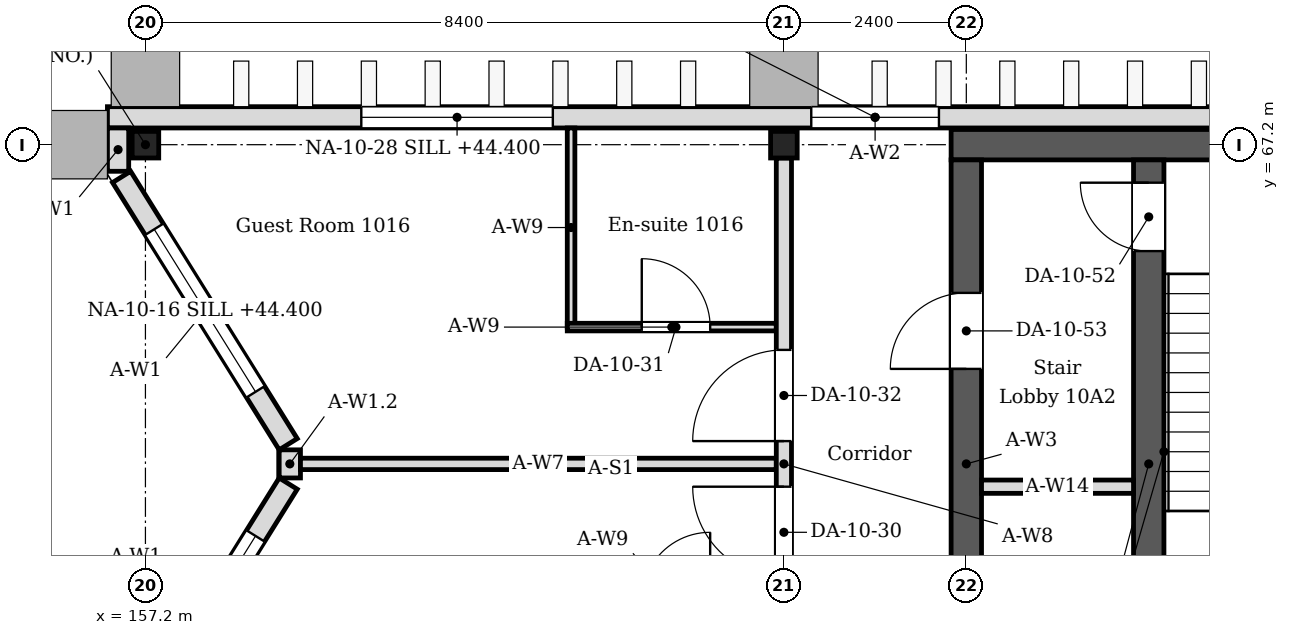
"""IFC4 building model, lengths in metres.
Left out: names, types, materials, properties, quantities, classifications, styles, units other than length and angle.
Written with IfcOpenShell. Run it as: python <this file> out.ifc"""

import sys

from ifc_helpers import new_model, si_unit, direction, frame, frame_2d, origin, origin_2d, place, context, subcontext, project, spatial, rectangle, i_section, extrude, element, fill, save


model = new_model("IFC4")
c1 = context("Model", 3, precision=1e-05, world=origin(), true_north=direction((0.0, 1.0)))
c2 = subcontext(c1, "Body", "Model", "MODEL_VIEW")
j1 = project(units=[si_unit("LENGTHUNIT", "METRE"), si_unit("PLANEANGLEUNIT", "RADIAN")], contexts=[c1])
p1 = place(None, origin())
s1 = spatial("IfcSite", under=j1, at=p1, CompositionType="ELEMENT")
p2 = place(p1, origin())
s2 = spatial("IfcBuilding", under=s1, at=p2, CompositionType="ELEMENT")
p3 = place(p2, frame((0.0, 0.0, 43.8)))
s3 = spatial("IfcBuildingStorey", under=s2, at=p3, CompositionType="ELEMENT", Elevation=43.8)
for number, where, z_axis, x_axis in (
    (1, (157.2, 67.2, 0.0), (0.0, 0.0, 1.0), (1.0, 0.0, 0.0)),
    (2, (165.6, 67.2, 0.0), (0.0, 0.0, 1.0), (1.0, 0.0, 0.0)),
):
    element("IfcColumn", number, at=place(p3, frame(where, z_axis=z_axis, x_axis=x_axis)), inside=s3, PredefinedType="COLUMN", context=c2, shape_type="SweptSolid", body=[
        extrude(i_section(OverallWidth=0.35, OverallDepth=0.35, WebThickness=0.012, FlangeThickness=0.019, FilletRadius=0.013, at=origin_2d()), origin(), (0.0, 0.0, 1.0), 4.2),
    ])
p4 = place(p3, frame((167.8, 67.2, 0.0), z_axis=(0.0, 0.0, 1.0), x_axis=(1.0, 0.0, 0.0)))
e3 = element("IfcWall", 3, at=p4, inside=s3, PredefinedType="SOLIDWALL", context=c2, shape_type="SweptSolid", body=[
    extrude(rectangle(XDim=8.8, YDim=0.4, at=frame_2d((4.4, 0.0))), origin(), (0.0, 0.0, 1.0), 4.05),
])
p5 = place(p3, frame((168.0, 59.0, 0.0), z_axis=(0.0, 0.0, 1.0), x_axis=(0.0, 1.0, 0.0)))
e4 = element("IfcWall", 4, at=p5, inside=s3, PredefinedType="SOLIDWALL", context=c2, shape_type="SweptSolid", body=[
    extrude(rectangle(XDim=8.0, YDim=0.4, at=frame_2d((4.0, 0.0))), origin(), (0.0, 0.0, 1.0), 4.05),
])
p6 = place(p5, frame((5.25, 0.0, 0.0)))
e5 = element("IfcOpeningElement", 5, at=p6, cuts=e4, PredefinedType="OPENING", context=c2, shape_type="SweptSolid", body=[
    extrude(rectangle(XDim=1.0, YDim=2.1, at=frame_2d((0.5, 1.05))), frame((0.0, 0.21, 0.0), z_axis=(0.0, -1.0, 0.0), x_axis=(1.0, 0.0, 0.0)), (0.0, 0.0, 1.0), 0.42),
])
p7 = place(p5, frame((1.275, 0.0, 0.0)))
e6 = element("IfcOpeningElement", 6, at=p7, cuts=e4, PredefinedType="OPENING", context=c2, shape_type="SweptSolid", body=[
    extrude(rectangle(XDim=1.05, YDim=2.1, at=frame_2d((0.525, 1.05))), frame((0.0, 0.21, 0.0), z_axis=(0.0, -1.0, 0.0), x_axis=(1.0, 0.0, 0.0)), (0.0, 0.0, 1.0), 0.42),
])
p8 = place(p3, frame((156.886, 59.224, 0.0), z_axis=(0.0, 0.0, 1.0), x_axis=(0.529018946142, 0.848610013271, 0.0)))
e7 = element("IfcWall", 7, at=p8, inside=s3, PredefinedType="SOLIDWALL", context=c2, shape_type="SweptSolid", body=[
    extrude(rectangle(XDim=4.144, YDim=0.28, at=frame_2d((2.072, 0.0))), origin(), (0.0, 0.0, 1.0), 4.05),
])
p9 = place(p8, frame((0.812, 0.0, 0.6)))
e8 = element("IfcOpeningElement", 8, at=p9, cuts=e7, PredefinedType="OPENING", context=c2, shape_type="SweptSolid", body=[
    extrude(rectangle(XDim=2.52, YDim=2.4, at=frame_2d((1.26, 1.2))), frame((0.0, 0.15, 0.0), z_axis=(0.0, -1.0, 0.0), x_axis=(1.0, 0.0, 0.0)), (0.0, 0.0, 1.0), 0.3),
])
p10 = place(p3, frame((159.079, 63.259, 0.0), z_axis=(0.0, 0.0, 1.0), x_axis=(-0.529018946142, 0.848610013271, 0.0)))
e9 = element("IfcWall", 9, at=p10, inside=s3, PredefinedType="SOLIDWALL", context=c2, shape_type="SweptSolid", body=[
    extrude(rectangle(XDim=4.144, YDim=0.28, at=frame_2d((2.072, 0.0))), origin(), (0.0, 0.0, 1.0), 4.05),
])
p11 = place(p10, frame((0.812, 0.0, 0.6)))
e10 = element("IfcOpeningElement", 10, at=p11, cuts=e9, PredefinedType="OPENING", context=c2, shape_type="SweptSolid", body=[
    extrude(rectangle(XDim=2.52, YDim=2.4, at=frame_2d((1.26, 1.2))), frame((0.0, 0.15, 0.0), z_axis=(0.0, -1.0, 0.0), x_axis=(1.0, 0.0, 0.0)), (0.0, 0.0, 1.0), 0.3),
])
p12 = place(p3, frame((159.1, 62.815, 0.0), z_axis=(0.0, 0.0, 1.0), x_axis=(0.0, 1.0, 0.0)))
e11 = element("IfcWall", 11, at=p12, inside=s3, PredefinedType="SOLIDWALL", context=c2, shape_type="SweptSolid", body=[
    extrude(rectangle(XDim=0.37, YDim=0.28, at=frame_2d((0.185, 0.0))), origin(), (0.0, 0.0, 1.0), 3.604),
])
p13 = place(p3, frame((156.84, 66.85, 0.0), z_axis=(0.0, 0.0, 1.0), x_axis=(0.0, 1.0, 0.0)))
e12 = element("IfcWall", 12, at=p13, inside=s3, PredefinedType="SOLIDWALL", context=c2, shape_type="SweptSolid", body=[
    extrude(rectangle(XDim=0.57, YDim=0.28, at=frame_2d((0.285, 0.0))), origin(), (0.0, 0.0, 1.0), 4.05),
])
p14 = place(p3, frame((156.7, 67.56, 0.0), z_axis=(0.0, 0.0, 1.0), x_axis=(1.0, 0.0, 0.0)))
e13 = element("IfcWall", 13, at=p14, inside=s3, PredefinedType="SOLIDWALL", context=c2, shape_type="SweptSolid", body=[
    extrude(rectangle(XDim=20.2, YDim=0.28, at=frame_2d((10.1, 0.0))), origin(), (0.0, 0.0, 1.0), 4.05),
])
p15 = place(p14, frame((9.26, 0.0, 0.6)))
e14 = element("IfcOpeningElement", 14, at=p15, cuts=e13, PredefinedType="OPENING", context=c2, shape_type="SweptSolid", body=[
    extrude(rectangle(XDim=1.68, YDim=2.4, at=frame_2d((0.84, 1.2))), frame((0.0, 0.15, 0.0), z_axis=(0.0, -1.0, 0.0), x_axis=(1.0, 0.0, 0.0)), (0.0, 0.0, 1.0), 0.3),
])
p16 = place(p14, frame((3.34, 0.0, 0.6)))
e15 = element("IfcOpeningElement", 15, at=p16, cuts=e13, PredefinedType="OPENING", context=c2, shape_type="SweptSolid", body=[
    extrude(rectangle(XDim=2.52, YDim=2.4, at=frame_2d((1.26, 1.2))), frame((0.0, 0.15, 0.0), z_axis=(0.0, -1.0, 0.0), x_axis=(1.0, 0.0, 0.0)), (0.0, 0.0, 1.0), 0.3),
])
p17 = place(p3, frame((162.8, 64.8, 0.0), z_axis=(0.0, 0.0, 1.0), x_axis=(0.0, 1.0, 0.0)))
e16 = element("IfcWall", 16, at=p17, inside=s3, PredefinedType="PARTITIONING", context=c2, shape_type="SweptSolid", body=[
    extrude(rectangle(XDim=2.62, YDim=0.1, at=frame_2d((1.31, 0.0))), origin(), (0.0, 0.0, 1.0), 4.05),
])
p18 = place(p3, frame((162.75, 64.8, 0.0), z_axis=(0.0, 0.0, 1.0), x_axis=(1.0, 0.0, 0.0)))
e17 = element("IfcWall", 17, at=p18, inside=s3, PredefinedType="PARTITIONING", context=c2, shape_type="SweptSolid", body=[
    extrude(rectangle(XDim=2.75, YDim=0.1, at=frame_2d((1.375, 0.0))), origin(), (0.0, 0.0, 1.0), 4.05),
])
p19 = place(p18, frame((0.98, 0.0, 0.0)))
e18 = element("IfcOpeningElement", 18, at=p19, cuts=e17, PredefinedType="OPENING", context=c2, shape_type="SweptSolid", body=[
    extrude(rectangle(XDim=0.9, YDim=2.1, at=frame_2d((0.45, 1.05))), frame((0.0, 0.06, 0.0), z_axis=(0.0, -1.0, 0.0), x_axis=(1.0, 0.0, 0.0)), (0.0, 0.0, 1.0), 0.12),
])
p20 = place(p3, frame((159.24, 63.0, 0.0), z_axis=(0.0, 0.0, 1.0), x_axis=(1.0, 0.0, 0.0)))
e19 = element("IfcWall", 19, at=p20, inside=s3, PredefinedType="PARTITIONING", context=c2, shape_type="SweptSolid", body=[
    extrude(rectangle(XDim=6.26, YDim=0.15, at=frame_2d((3.13, 0.0))), origin(), (0.0, 0.0, 1.0), 3.604),
])
p21 = place(p3, frame((165.6, 58.975, 0.0), z_axis=(0.0, 0.0, 1.0), x_axis=(0.0, 1.0, 0.0)))
e20 = element("IfcWall", 20, at=p21, inside=s3, PredefinedType="PARTITIONING", context=c2, shape_type="SweptSolid", body=[
    extrude(rectangle(XDim=8.05, YDim=0.2, at=frame_2d((4.025, 0.0))), origin(), (0.0, 0.0, 1.0), 3.45),
])
p22 = place(p21, frame((2.525, 0.0, 0.0)))
e21 = element("IfcOpeningElement", 21, at=p22, cuts=e20, PredefinedType="OPENING", context=c2, shape_type="SweptSolid", body=[
    extrude(rectangle(XDim=1.2, YDim=2.1, at=frame_2d((0.6, 1.05))), frame((0.0, 0.11, 0.0), z_axis=(0.0, -1.0, 0.0), x_axis=(1.0, 0.0, 0.0)), (0.0, 0.0, 1.0), 0.22),
])
p23 = place(p21, frame((4.325, 0.0, 0.0)))
e22 = element("IfcOpeningElement", 22, at=p23, cuts=e20, PredefinedType="OPENING", context=c2, shape_type="SweptSolid", body=[
    extrude(rectangle(XDim=1.2, YDim=2.1, at=frame_2d((0.6, 1.05))), frame((0.0, 0.11, 0.0), z_axis=(0.0, -1.0, 0.0), x_axis=(1.0, 0.0, 0.0)), (0.0, 0.0, 1.0), 0.22),
])
p24 = place(p3, frame((170.4, 59.0, 0.0), z_axis=(0.0, 0.0, 1.0), x_axis=(0.0, 1.0, 0.0)))
e23 = element("IfcWall", 23, at=p24, inside=s3, PredefinedType="SOLIDWALL", context=c2, shape_type="SweptSolid", body=[
    extrude(rectangle(XDim=8.0, YDim=0.4, at=frame_2d((4.0, 0.0))), origin(), (0.0, 0.0, 1.0), 4.05),
])
p25 = place(p24, frame((6.8, 0.0, 0.0)))
e24 = element("IfcOpeningElement", 24, at=p25, cuts=e23, PredefinedType="OPENING", context=c2, shape_type="SweptSolid", body=[
    extrude(rectangle(XDim=0.9, YDim=2.1, at=frame_2d((0.45, 1.05))), frame((0.0, 0.21, 0.0), z_axis=(0.0, -1.0, 0.0), x_axis=(1.0, 0.0, 0.0)), (0.0, 0.0, 1.0), 0.42),
])
p26 = place(p3, frame((168.2, 62.7, 0.0), z_axis=(0.0, 0.0, 1.0), x_axis=(1.0, 0.0, 0.0)))
e25 = element("IfcWall", 25, at=p26, inside=s3, PredefinedType="PARTITIONING", context=c2, shape_type="SweptSolid", body=[
    extrude(rectangle(XDim=2.0, YDim=0.175, at=frame_2d((1.0, 0.0))), origin(), (0.0, 0.0, 1.0), 4.05),
])
p27 = place(p9, origin())
e26 = element("IfcWindow", 26, at=p27, inside=s3, PartitioningType="SINGLE_PANEL", PredefinedType="WINDOW", context=c2, shape_type="SweptSolid", body=[
    extrude(rectangle(XDim=2.52, YDim=2.4, at=frame_2d((1.26, 1.2))), frame((0.0, 0.03, 0.0), z_axis=(0.0, -1.0, 0.0), x_axis=(1.0, 0.0, 0.0)), (0.0, 0.0, 1.0), 0.06),
])
fill(e8, e26)
p28 = place(p11, origin())
e27 = element("IfcWindow", 27, at=p28, inside=s3, PartitioningType="SINGLE_PANEL", PredefinedType="WINDOW", context=c2, shape_type="SweptSolid", body=[
    extrude(rectangle(XDim=2.52, YDim=2.4, at=frame_2d((1.26, 1.2))), frame((0.0, 0.03, 0.0), z_axis=(0.0, -1.0, 0.0), x_axis=(1.0, 0.0, 0.0)), (0.0, 0.0, 1.0), 0.06),
])
fill(e10, e27)
p29 = place(p15, origin())
e28 = element("IfcWindow", 28, at=p29, inside=s3, PartitioningType="SINGLE_PANEL", PredefinedType="WINDOW", context=c2, shape_type="SweptSolid", body=[
    extrude(rectangle(XDim=1.68, YDim=2.4, at=frame_2d((0.84, 1.2))), frame((0.0, 0.03, 0.0), z_axis=(0.0, -1.0, 0.0), x_axis=(1.0, 0.0, 0.0)), (0.0, 0.0, 1.0), 0.06),
])
fill(e14, e28)
p30 = place(p16, origin())
e29 = element("IfcWindow", 29, at=p30, inside=s3, PartitioningType="SINGLE_PANEL", PredefinedType="WINDOW", context=c2, shape_type="SweptSolid", body=[
    extrude(rectangle(XDim=2.52, YDim=2.4, at=frame_2d((1.26, 1.2))), frame((0.0, 0.03, 0.0), z_axis=(0.0, -1.0, 0.0), x_axis=(1.0, 0.0, 0.0)), (0.0, 0.0, 1.0), 0.06),
])
fill(e15, e29)
p31 = place(p22, origin())
e30 = element("IfcDoor", 30, at=p31, inside=s3, OperationType="SINGLE_SWING_RIGHT", PredefinedType="DOOR", context=c2, shape_type="SweptSolid", body=[
    extrude(rectangle(XDim=1.2, YDim=2.1, at=frame_2d((0.6, 1.05))), frame((0.0, 0.025, 0.0), z_axis=(0.0, -1.0, 0.0), x_axis=(1.0, 0.0, 0.0)), (0.0, 0.0, 1.0), 0.05),
])
fill(e21, e30)
p32 = place(p19, origin())
e31 = element("IfcDoor", 31, at=p32, inside=s3, OperationType="SINGLE_SWING_LEFT", PredefinedType="DOOR", context=c2, shape_type="SweptSolid", body=[
    extrude(rectangle(XDim=0.9, YDim=2.1, at=frame_2d((0.45, 1.05))), frame((0.0, 0.025, 0.0), z_axis=(0.0, -1.0, 0.0), x_axis=(1.0, 0.0, 0.0)), (0.0, 0.0, 1.0), 0.05),
])
fill(e18, e31)
p33 = place(p23, origin())
e32 = element("IfcDoor", 32, at=p33, inside=s3, OperationType="SINGLE_SWING_LEFT", PredefinedType="DOOR", context=c2, shape_type="SweptSolid", body=[
    extrude(rectangle(XDim=1.2, YDim=2.1, at=frame_2d((0.6, 1.05))), frame((0.0, 0.025, 0.0), z_axis=(0.0, -1.0, 0.0), x_axis=(1.0, 0.0, 0.0)), (0.0, 0.0, 1.0), 0.05),
])
fill(e22, e32)
p34 = place(p25, origin())
e33 = element("IfcDoor", 33, at=p34, inside=s3, OperationType="SINGLE_SWING_RIGHT", PredefinedType="DOOR", context=c2, shape_type="SweptSolid", body=[
    extrude(rectangle(XDim=0.9, YDim=2.1, at=frame_2d((0.45, 1.05))), frame((0.0, 0.025, 0.0), z_axis=(0.0, -1.0, 0.0), x_axis=(1.0, 0.0, 0.0)), (0.0, 0.0, 1.0), 0.05),
])
fill(e24, e33)
p35 = place(p6, origin())
e34 = element("IfcDoor", 34, at=p35, inside=s3, OperationType="SINGLE_SWING_LEFT", PredefinedType="DOOR", context=c2, shape_type="SweptSolid", body=[
    extrude(rectangle(XDim=1.0, YDim=2.1, at=frame_2d((0.5, 1.05))), frame((0.0, 0.025, 0.0), z_axis=(0.0, -1.0, 0.0), x_axis=(1.0, 0.0, 0.0)), (0.0, 0.0, 1.0), 0.05),
])
fill(e5, e34)
save(model, sys.argv[1])
